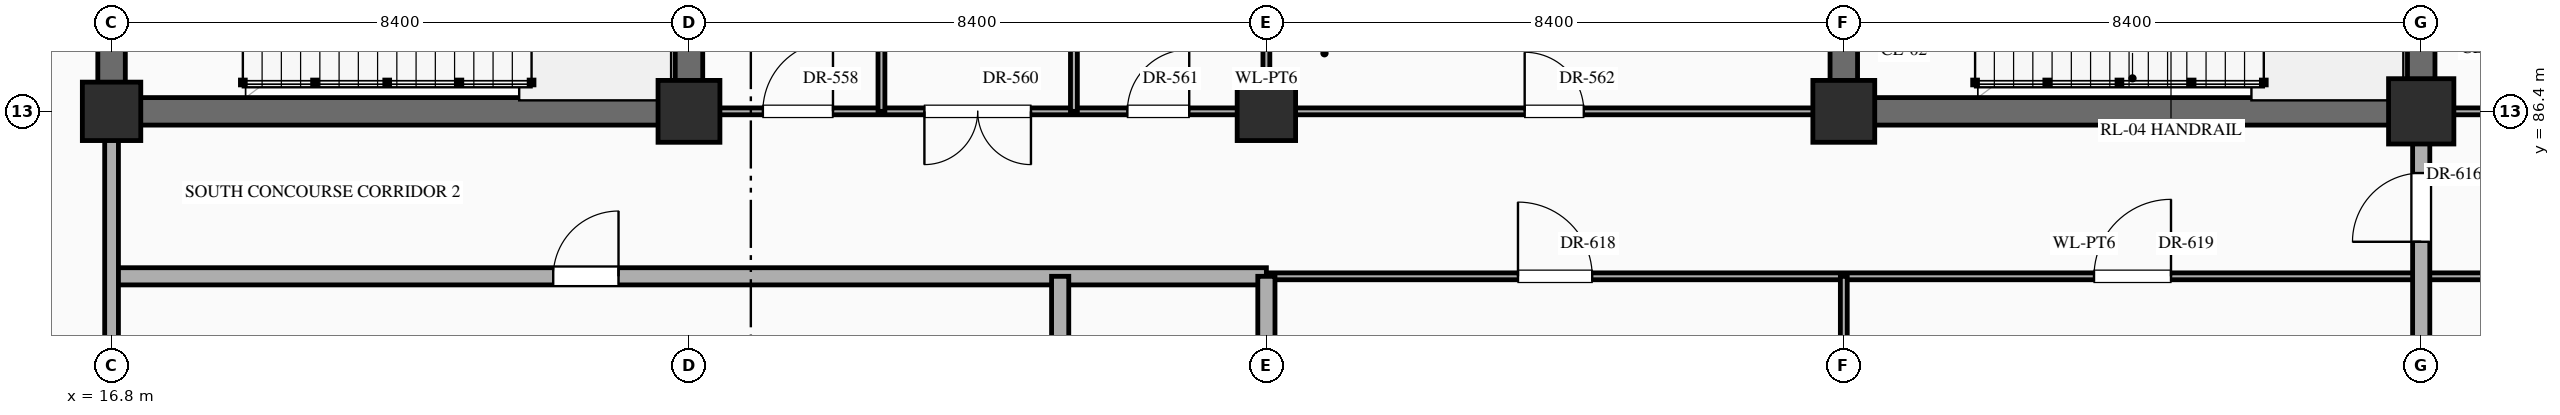
"""IFC4 building model, lengths in metres.
Left out: names, types, materials, properties, quantities, classifications, styles, units other than length and angle.
Written with IfcOpenShell. Run it as: python <this file> out.ifc"""

import sys

from ifc_helpers import new_model, si_unit, direction, frame, frame_2d, origin, origin_2d, place, context, subcontext, project, spatial, rectangle, extrude, element, fill, save


model = new_model("IFC4")
c1 = context("Model", 3, precision=1e-05, world=origin(), true_north=direction((0.0, 1.0)))
c2 = subcontext(c1, "Body", "Model", "MODEL_VIEW")
j1 = project(units=[si_unit("LENGTHUNIT", "METRE"), si_unit("PLANEANGLEUNIT", "RADIAN")], contexts=[c1])
p1 = place(None, origin())
s1 = spatial("IfcSite", under=j1, at=p1, CompositionType="ELEMENT")
p2 = place(p1, origin())
s2 = spatial("IfcBuilding", under=s1, at=p2, CompositionType="ELEMENT")
p3 = place(p2, frame((0.0, 0.0, -5.4)))
s3 = spatial("IfcBuildingStorey", under=s2, at=p3, CompositionType="ELEMENT", Elevation=-5.4)
p4 = place(p3, frame((16.8, 86.4, 0.0), z_axis=(0.0, 0.0, 1.0), x_axis=(1.0, 0.0, 0.0)))
e1 = element("IfcColumn", 1, at=p4, inside=s3, PredefinedType="COLUMN", context=c2, shape_type="SweptSolid", body=[
    extrude(rectangle(XDim=0.85, YDim=0.85, at=origin_2d()), origin(), (0.0, 0.0, 1.0), 5.4),
])
p5 = place(p3, frame((25.2, 86.4, 0.0), z_axis=(0.0, 0.0, 1.0), x_axis=(1.0, 0.0, 0.0)))
e2 = element("IfcColumn", 2, at=p5, inside=s3, PredefinedType="COLUMN", context=c2, shape_type="SweptSolid", body=[
    extrude(rectangle(XDim=0.9, YDim=0.9, at=origin_2d()), origin(), (0.0, 0.0, 1.0), 5.4),
])
p6 = place(p3, frame((33.6, 86.4, 0.0), z_axis=(0.0, 0.0, 1.0), x_axis=(1.0, 0.0, 0.0)))
e3 = element("IfcColumn", 3, at=p6, inside=s3, PredefinedType="COLUMN", context=c2, shape_type="SweptSolid", body=[
    extrude(rectangle(XDim=0.85, YDim=0.85, at=origin_2d()), origin(), (0.0, 0.0, 1.0), 5.4),
])
p7 = place(p3, frame((42.0, 86.4, 0.0), z_axis=(0.0, 0.0, 1.0), x_axis=(1.0, 0.0, 0.0)))
e4 = element("IfcColumn", 4, at=p7, inside=s3, PredefinedType="COLUMN", context=c2, shape_type="SweptSolid", body=[
    extrude(rectangle(XDim=0.9, YDim=0.9, at=origin_2d()), origin(), (0.0, 0.0, 1.0), 5.4),
])
p8 = place(p3, frame((50.4, 86.4, 0.0), z_axis=(0.0, 0.0, 1.0), x_axis=(1.0, 0.0, 0.0)))
e5 = element("IfcColumn", 5, at=p8, inside=s3, PredefinedType="COLUMN", context=c2, shape_type="SweptSolid", body=[
    extrude(rectangle(XDim=0.95, YDim=0.95, at=origin_2d()), origin(), (0.0, 0.0, 1.0), 5.4),
])
p9 = place(p3, frame((16.8, 84.0, 0.0), z_axis=(0.0, 0.0, 1.0), x_axis=(1.0, 0.0, 0.0)))
e6 = element("IfcWall", 6, at=p9, inside=s3, PredefinedType="STANDARD", context=c2, shape_type="SweptSolid", body=[
    extrude(rectangle(XDim=16.8, YDim=0.25, at=frame_2d((8.4, 0.0))), origin(), (0.0, 0.0, 1.0), 5.1),
])
p10 = place(p9, frame((6.425, 0.0, 0.0)))
e7 = element("IfcOpeningElement", 7, at=p10, cuts=e6, PredefinedType="OPENING", context=c2, shape_type="SweptSolid", body=[
    extrude(rectangle(XDim=0.95, YDim=2.15, at=frame_2d((0.475, 1.075))), frame((0.0, 0.137, 0.0), z_axis=(0.0, -1.0, 0.0), x_axis=(1.0, 0.0, 0.0)), (0.0, 0.0, 1.0), 0.274),
])
p11 = place(p3, frame((33.6, 84.0, 0.0), z_axis=(0.0, 0.0, 1.0), x_axis=(1.0, 0.0, 0.0)))
e8 = element("IfcWall", 8, at=p11, inside=s3, PredefinedType="STANDARD", context=c2, shape_type="SweptSolid", body=[
    extrude(rectangle(XDim=117.6, YDim=0.1, at=frame_2d((58.8, 0.0))), origin(), (0.0, 0.0, 1.0), 5.1),
])
p12 = place(p11, frame((3.66, 0.0, 0.0)))
e9 = element("IfcOpeningElement", 9, at=p12, cuts=e8, PredefinedType="OPENING", context=c2, shape_type="SweptSolid", body=[
    extrude(rectangle(XDim=1.08, YDim=2.25, at=frame_2d((0.54, 1.125))), frame((0.0, 0.062, 0.0), z_axis=(0.0, -1.0, 0.0), x_axis=(1.0, 0.0, 0.0)), (0.0, 0.0, 1.0), 0.124),
])
p13 = place(p11, frame((12.04, 0.0, 0.0)))
e10 = element("IfcOpeningElement", 10, at=p13, cuts=e8, PredefinedType="OPENING", context=c2, shape_type="SweptSolid", body=[
    extrude(rectangle(XDim=1.12, YDim=2.25, at=frame_2d((0.56, 1.125))), frame((0.0, 0.062, 0.0), z_axis=(0.0, -1.0, 0.0), x_axis=(1.0, 0.0, 0.0)), (0.0, 0.0, 1.0), 0.124),
])
p14 = place(p11, frame((20.4, 0.0, 0.0)))
e11 = element("IfcOpeningElement", 11, at=p14, cuts=e8, PredefinedType="OPENING", context=c2, shape_type="SweptSolid", body=[
    extrude(rectangle(XDim=1.2, YDim=2.35, at=frame_2d((0.6, 1.175))), frame((0.0, 0.062, 0.0), z_axis=(0.0, -1.0, 0.0), x_axis=(1.0, 0.0, 0.0)), (0.0, 0.0, 1.0), 0.124),
])
p15 = place(p11, frame((28.78, 0.0, 0.0)))
e12 = element("IfcOpeningElement", 12, at=p15, cuts=e8, PredefinedType="OPENING", context=c2, shape_type="SweptSolid", body=[
    extrude(rectangle(XDim=1.24, YDim=2.3, at=frame_2d((0.62, 1.15))), frame((0.0, 0.062, 0.0), z_axis=(0.0, -1.0, 0.0), x_axis=(1.0, 0.0, 0.0)), (0.0, 0.0, 1.0), 0.124),
])
p16 = place(p11, frame((37.16, 0.0, 0.0)))
e13 = element("IfcOpeningElement", 13, at=p16, cuts=e8, PredefinedType="OPENING", context=c2, shape_type="SweptSolid", body=[
    extrude(rectangle(XDim=1.28, YDim=2.35, at=frame_2d((0.64, 1.175))), frame((0.0, 0.062, 0.0), z_axis=(0.0, -1.0, 0.0), x_axis=(1.0, 0.0, 0.0)), (0.0, 0.0, 1.0), 0.124),
])
p17 = place(p11, frame((42.93, 0.0, 0.0)))
e14 = element("IfcOpeningElement", 14, at=p17, cuts=e8, PredefinedType="OPENING", context=c2, shape_type="SweptSolid", body=[
    extrude(rectangle(XDim=0.94, YDim=2.3, at=frame_2d((0.47, 1.15))), frame((0.0, 0.062, 0.0), z_axis=(0.0, -1.0, 0.0), x_axis=(1.0, 0.0, 0.0)), (0.0, 0.0, 1.0), 0.124),
])
p18 = place(p11, frame((45.71, 0.0, 0.0)))
e15 = element("IfcOpeningElement", 15, at=p18, cuts=e8, PredefinedType="OPENING", context=c2, shape_type="SweptSolid", body=[
    extrude(rectangle(XDim=0.98, YDim=2.35, at=frame_2d((0.49, 1.175))), frame((0.0, 0.062, 0.0), z_axis=(0.0, -1.0, 0.0), x_axis=(1.0, 0.0, 0.0)), (0.0, 0.0, 1.0), 0.124),
])
p19 = place(p11, frame((48.49, 0.0, 0.0)))
e16 = element("IfcOpeningElement", 16, at=p19, cuts=e8, PredefinedType="OPENING", context=c2, shape_type="SweptSolid", body=[
    extrude(rectangle(XDim=1.02, YDim=2.4, at=frame_2d((0.51, 1.2))), frame((0.0, 0.062, 0.0), z_axis=(0.0, -1.0, 0.0), x_axis=(1.0, 0.0, 0.0)), (0.0, 0.0, 1.0), 0.124),
])
p20 = place(p11, frame((54.03, 0.0, 0.0)))
e17 = element("IfcOpeningElement", 17, at=p20, cuts=e8, PredefinedType="OPENING", context=c2, shape_type="SweptSolid", body=[
    extrude(rectangle(XDim=1.14, YDim=2.4, at=frame_2d((0.57, 1.2))), frame((0.0, 0.062, 0.0), z_axis=(0.0, -1.0, 0.0), x_axis=(1.0, 0.0, 0.0)), (0.0, 0.0, 1.0), 0.124),
])
p21 = place(p11, frame((62.55, 0.0, 0.0)))
e18 = element("IfcOpeningElement", 18, at=p21, cuts=e8, PredefinedType="OPENING", context=c2, shape_type="SweptSolid", body=[
    extrude(rectangle(XDim=0.9, YDim=2.15, at=frame_2d((0.45, 1.075))), frame((0.0, 0.062, 0.0), z_axis=(0.0, -1.0, 0.0), x_axis=(1.0, 0.0, 0.0)), (0.0, 0.0, 1.0), 0.124),
])
p22 = place(p11, frame((70.97, 0.0, 0.0)))
e19 = element("IfcOpeningElement", 19, at=p22, cuts=e8, PredefinedType="OPENING", context=c2, shape_type="SweptSolid", body=[
    extrude(rectangle(XDim=0.86, YDim=2.1, at=frame_2d((0.43, 1.05))), frame((0.0, 0.062, 0.0), z_axis=(0.0, -1.0, 0.0), x_axis=(1.0, 0.0, 0.0)), (0.0, 0.0, 1.0), 0.124),
])
p23 = place(p11, frame((79.34, 0.0, 0.0)))
e20 = element("IfcOpeningElement", 20, at=p23, cuts=e8, PredefinedType="OPENING", context=c2, shape_type="SweptSolid", body=[
    extrude(rectangle(XDim=0.92, YDim=2.15, at=frame_2d((0.46, 1.075))), frame((0.0, 0.062, 0.0), z_axis=(0.0, -1.0, 0.0), x_axis=(1.0, 0.0, 0.0)), (0.0, 0.0, 1.0), 0.124),
])
p24 = place(p11, frame((87.72, 0.0, 0.0)))
e21 = element("IfcOpeningElement", 21, at=p24, cuts=e8, PredefinedType="OPENING", context=c2, shape_type="SweptSolid", body=[
    extrude(rectangle(XDim=0.96, YDim=2.2, at=frame_2d((0.48, 1.1))), frame((0.0, 0.062, 0.0), z_axis=(0.0, -1.0, 0.0), x_axis=(1.0, 0.0, 0.0)), (0.0, 0.0, 1.0), 0.124),
])
p25 = place(p11, frame((96.1, 0.0, 0.0)))
e22 = element("IfcOpeningElement", 22, at=p25, cuts=e8, PredefinedType="OPENING", context=c2, shape_type="SweptSolid", body=[
    extrude(rectangle(XDim=1.0, YDim=2.25, at=frame_2d((0.5, 1.125))), frame((0.0, 0.062, 0.0), z_axis=(0.0, -1.0, 0.0), x_axis=(1.0, 0.0, 0.0)), (0.0, 0.0, 1.0), 0.124),
])
p26 = place(p11, frame((104.48, 0.0, 0.0)))
e23 = element("IfcOpeningElement", 23, at=p26, cuts=e8, PredefinedType="OPENING", context=c2, shape_type="SweptSolid", body=[
    extrude(rectangle(XDim=1.04, YDim=2.2, at=frame_2d((0.52, 1.1))), frame((0.0, 0.062, 0.0), z_axis=(0.0, -1.0, 0.0), x_axis=(1.0, 0.0, 0.0)), (0.0, 0.0, 1.0), 0.124),
])
p27 = place(p11, frame((112.86, 0.0, 0.0)))
e24 = element("IfcOpeningElement", 24, at=p27, cuts=e8, PredefinedType="OPENING", context=c2, shape_type="SweptSolid", body=[
    extrude(rectangle(XDim=1.08, YDim=2.25, at=frame_2d((0.54, 1.125))), frame((0.0, 0.062, 0.0), z_axis=(0.0, -1.0, 0.0), x_axis=(1.0, 0.0, 0.0)), (0.0, 0.0, 1.0), 0.124),
])
p28 = place(p3, frame((16.8, 86.4, 0.0), z_axis=(0.0, 0.0, 1.0), x_axis=(1.0, 0.0, 0.0)))
e25 = element("IfcWall", 25, at=p28, inside=s3, PredefinedType="SHEAR", context=c2, shape_type="SweptSolid", body=[
    extrude(rectangle(XDim=8.4, YDim=0.4, at=frame_2d((4.2, 0.0))), origin(), (0.0, 0.0, 1.0), 5.1),
])
p29 = place(p3, frame((25.2, 86.4, 0.0), z_axis=(0.0, 0.0, 1.0), x_axis=(1.0, 0.0, 0.0)))
e26 = element("IfcWall", 26, at=p29, inside=s3, PredefinedType="STANDARD", context=c2, shape_type="SweptSolid", body=[
    extrude(rectangle(XDim=16.8, YDim=0.1, at=frame_2d((8.4, 0.0))), origin(), (0.0, 0.0, 1.0), 4.25),
])
p30 = place(p29, frame((1.075, 0.0, 0.0)))
e27 = element("IfcOpeningElement", 27, at=p30, cuts=e26, PredefinedType="OPENING", context=c2, shape_type="SweptSolid", body=[
    extrude(rectangle(XDim=1.02, YDim=2.4, at=frame_2d((0.51, 1.2))), frame((0.0, 0.062, 0.0), z_axis=(0.0, -1.0, 0.0), x_axis=(1.0, 0.0, 0.0)), (0.0, 0.0, 1.0), 0.124),
])
p31 = place(p29, frame((3.425, 0.0, 0.0)))
e28 = element("IfcOpeningElement", 28, at=p31, cuts=e26, PredefinedType="OPENING", context=c2, shape_type="SweptSolid", body=[
    extrude(rectangle(XDim=1.55, YDim=2.35, at=frame_2d((0.775, 1.175))), frame((0.0, 0.062, 0.0), z_axis=(0.0, -1.0, 0.0), x_axis=(1.0, 0.0, 0.0)), (0.0, 0.0, 1.0), 0.124),
])
p32 = place(p29, frame((6.377, 0.0, 0.0)))
e29 = element("IfcOpeningElement", 29, at=p32, cuts=e26, PredefinedType="OPENING", context=c2, shape_type="SweptSolid", body=[
    extrude(rectangle(XDim=0.9, YDim=2.15, at=frame_2d((0.45, 1.075))), frame((0.0, 0.062, 0.0), z_axis=(0.0, -1.0, 0.0), x_axis=(1.0, 0.0, 0.0)), (0.0, 0.0, 1.0), 0.124),
])
p33 = place(p29, frame((12.157, 0.0, 0.0)))
e30 = element("IfcOpeningElement", 30, at=p33, cuts=e26, PredefinedType="OPENING", context=c2, shape_type="SweptSolid", body=[
    extrude(rectangle(XDim=0.86, YDim=2.1, at=frame_2d((0.43, 1.05))), frame((0.0, 0.062, 0.0), z_axis=(0.0, -1.0, 0.0), x_axis=(1.0, 0.0, 0.0)), (0.0, 0.0, 1.0), 0.124),
])
p34 = place(p3, frame((42.0, 86.4, 0.0), z_axis=(0.0, 0.0, 1.0), x_axis=(1.0, 0.0, 0.0)))
e31 = element("IfcWall", 31, at=p34, inside=s3, PredefinedType="SHEAR", context=c2, shape_type="SweptSolid", body=[
    extrude(rectangle(XDim=8.4, YDim=0.4, at=frame_2d((4.2, 0.0))), origin(), (0.0, 0.0, 1.0), 5.1),
])
p35 = place(p3, frame((50.4, 86.4, 0.0), z_axis=(0.0, 0.0, 1.0), x_axis=(1.0, 0.0, 0.0)))
e32 = element("IfcWall", 32, at=p35, inside=s3, PredefinedType="STANDARD", context=c2, shape_type="SweptSolid", body=[
    extrude(rectangle(XDim=8.4, YDim=0.1, at=frame_2d((4.2, 0.0))), origin(), (0.0, 0.0, 1.0), 4.25),
])
p36 = place(p35, frame((1.117, 0.0, 0.0)))
e33 = element("IfcOpeningElement", 33, at=p36, cuts=e32, PredefinedType="OPENING", context=c2, shape_type="SweptSolid", body=[
    extrude(rectangle(XDim=0.96, YDim=2.2, at=frame_2d((0.48, 1.1))), frame((0.0, 0.062, 0.0), z_axis=(0.0, -1.0, 0.0), x_axis=(1.0, 0.0, 0.0)), (0.0, 0.0, 1.0), 0.124),
])
p37 = place(p35, frame((3.68, 0.0, 0.0)))
e34 = element("IfcOpeningElement", 34, at=p37, cuts=e32, PredefinedType="OPENING", context=c2, shape_type="SweptSolid", body=[
    extrude(rectangle(XDim=1.04, YDim=2.2, at=frame_2d((0.52, 1.1))), frame((0.0, 0.062, 0.0), z_axis=(0.0, -1.0, 0.0), x_axis=(1.0, 0.0, 0.0)), (0.0, 0.0, 1.0), 0.124),
])
p38 = place(p35, frame((6.262, 0.0, 0.0)))
e35 = element("IfcOpeningElement", 35, at=p38, cuts=e32, PredefinedType="OPENING", context=c2, shape_type="SweptSolid", body=[
    extrude(rectangle(XDim=1.08, YDim=2.25, at=frame_2d((0.54, 1.125))), frame((0.0, 0.062, 0.0), z_axis=(0.0, -1.0, 0.0), x_axis=(1.0, 0.0, 0.0)), (0.0, 0.0, 1.0), 0.124),
])
p39 = place(p3, frame((16.8, 60.0, 0.0), z_axis=(0.0, 0.0, 1.0), x_axis=(0.0, 1.0, 0.0)))
e36 = element("IfcWall", 36, at=p39, inside=s3, PredefinedType="STANDARD", context=c2, shape_type="SweptSolid", body=[
    extrude(rectangle(XDim=26.4, YDim=0.2, at=frame_2d((13.2, 0.0))), origin(), (0.0, 0.0, 1.0), 4.23),
])
for number, where, z_axis, x_axis in (
    (37, (16.8, 86.4, 0.0), (0.0, 0.0, 1.0), (0.0, 1.0, 0.0)),
    (38, (25.2, 86.4, 0.0), (0.0, 0.0, 1.0), (0.0, 1.0, 0.0)),
):
    element("IfcWall", number, at=place(p3, frame(where, z_axis=z_axis, x_axis=x_axis)), inside=s3, PredefinedType="SHEAR", context=c2, shape_type="SweptSolid", body=[
        extrude(rectangle(XDim=4.8, YDim=0.4, at=frame_2d((2.4, 0.0))), origin(), (0.0, 0.0, 1.0), 5.1),
    ])
p40 = place(p3, frame((28.0, 86.4, 0.0), z_axis=(0.0, 0.0, 1.0), x_axis=(0.0, 1.0, 0.0)))
e39 = element("IfcWall", 39, at=p40, inside=s3, PredefinedType="STANDARD", context=c2, shape_type="SweptSolid", body=[
    extrude(rectangle(XDim=7.2, YDim=0.1, at=frame_2d((3.6, 0.0))), origin(), (0.0, 0.0, 1.0), 5.1),
])
p41 = place(p40, frame((3.11, 0.0, 0.0)))
e40 = element("IfcOpeningElement", 40, at=p41, cuts=e39, PredefinedType="OPENING", context=c2, shape_type="SweptSolid", body=[
    extrude(rectangle(XDim=0.98, YDim=2.35, at=frame_2d((0.49, 1.175))), frame((0.0, 0.062, 0.0), z_axis=(0.0, -1.0, 0.0), x_axis=(1.0, 0.0, 0.0)), (0.0, 0.0, 1.0), 0.124),
])
p42 = place(p3, frame((30.6, 79.2, 0.0), z_axis=(0.0, 0.0, 1.0), x_axis=(0.0, 1.0, 0.0)))
e41 = element("IfcWall", 41, at=p42, inside=s3, PredefinedType="STANDARD", context=c2, shape_type="SweptSolid", body=[
    extrude(rectangle(XDim=4.8, YDim=0.25, at=frame_2d((2.4, 0.0))), origin(), (0.0, 0.0, 1.0), 5.1),
])
p43 = place(p42, frame((1.9, 0.0, 0.0)))
e42 = element("IfcOpeningElement", 42, at=p43, cuts=e41, PredefinedType="OPENING", context=c2, shape_type="SweptSolid", body=[
    extrude(rectangle(XDim=1.0, YDim=2.2, at=frame_2d((0.5, 1.1))), frame((0.0, 0.137, 0.0), z_axis=(0.0, -1.0, 0.0), x_axis=(1.0, 0.0, 0.0)), (0.0, 0.0, 1.0), 0.274),
])
p44 = place(p3, frame((30.8, 86.4, 0.0), z_axis=(0.0, 0.0, 1.0), x_axis=(0.0, 1.0, 0.0)))
e43 = element("IfcWall", 43, at=p44, inside=s3, PredefinedType="STANDARD", context=c2, shape_type="SweptSolid", body=[
    extrude(rectangle(XDim=7.2, YDim=0.1, at=frame_2d((3.6, 0.0))), origin(), (0.0, 0.0, 1.0), 5.1),
])
p45 = place(p44, frame((3.07, 0.0, 0.0)))
e44 = element("IfcOpeningElement", 44, at=p45, cuts=e43, PredefinedType="OPENING", context=c2, shape_type="SweptSolid", body=[
    extrude(rectangle(XDim=1.06, YDim=2.4, at=frame_2d((0.53, 1.2))), frame((0.0, 0.062, 0.0), z_axis=(0.0, -1.0, 0.0), x_axis=(1.0, 0.0, 0.0)), (0.0, 0.0, 1.0), 0.124),
])
p46 = place(p3, frame((33.6, 79.2, 0.0), z_axis=(0.0, 0.0, 1.0), x_axis=(0.0, 1.0, 0.0)))
e45 = element("IfcWall", 45, at=p46, inside=s3, PredefinedType="STANDARD", context=c2, shape_type="SweptSolid", body=[
    extrude(rectangle(XDim=4.8, YDim=0.25, at=frame_2d((2.4, 0.0))), origin(), (0.0, 0.0, 1.0), 4.35),
])
p47 = place(p3, frame((33.6, 86.4, 0.0), z_axis=(0.0, 0.0, 1.0), x_axis=(0.0, 1.0, 0.0)))
e46 = element("IfcWall", 46, at=p47, inside=s3, PredefinedType="STANDARD", context=c2, shape_type="SweptSolid", body=[
    extrude(rectangle(XDim=7.2, YDim=0.1, at=frame_2d((3.6, 0.0))), origin(), (0.0, 0.0, 1.0), 4.35),
])
p48 = place(p3, frame((42.0, 79.2, 0.0), z_axis=(0.0, 0.0, 1.0), x_axis=(0.0, 1.0, 0.0)))
e47 = element("IfcWall", 47, at=p48, inside=s3, PredefinedType="STANDARD", context=c2, shape_type="SweptSolid", body=[
    extrude(rectangle(XDim=4.8, YDim=0.1, at=frame_2d((2.4, 0.0))), origin(), (0.0, 0.0, 1.0), 4.35),
])
p49 = place(p3, frame((42.0, 86.4, 0.0), z_axis=(0.0, 0.0, 1.0), x_axis=(0.0, 1.0, 0.0)))
e48 = element("IfcWall", 48, at=p49, inside=s3, PredefinedType="SHEAR", context=c2, shape_type="SweptSolid", body=[
    extrude(rectangle(XDim=4.8, YDim=0.4, at=frame_2d((2.4, 0.0))), origin(), (0.0, 0.0, 1.0), 5.1),
])
p50 = place(p3, frame((50.4, 43.2, 0.0), z_axis=(0.0, 0.0, 1.0), x_axis=(0.0, 1.0, 0.0)))
e49 = element("IfcWall", 49, at=p50, inside=s3, PredefinedType="STANDARD", context=c2, shape_type="SweptSolid", body=[
    extrude(rectangle(XDim=43.2, YDim=0.25, at=frame_2d((21.6, 0.0))), origin(), (0.0, 0.0, 1.0), 4.23),
])
p51 = place(p50, frame((41.302, 0.0, 0.0)))
e50 = element("IfcOpeningElement", 50, at=p51, cuts=e49, PredefinedType="OPENING", context=c2, shape_type="SweptSolid", body=[
    extrude(rectangle(XDim=1.0, YDim=2.2, at=frame_2d((0.5, 1.1))), frame((0.0, 0.137, 0.0), z_axis=(0.0, -1.0, 0.0), x_axis=(1.0, 0.0, 0.0)), (0.0, 0.0, 1.0), 0.274),
])
p52 = place(p3, frame((50.4, 86.4, 0.0), z_axis=(0.0, 0.0, 1.0), x_axis=(0.0, 1.0, 0.0)))
e51 = element("IfcWall", 51, at=p52, inside=s3, PredefinedType="SHEAR", context=c2, shape_type="SweptSolid", body=[
    extrude(rectangle(XDim=4.8, YDim=0.4, at=frame_2d((2.4, 0.0))), origin(), (0.0, 0.0, 1.0), 5.1),
])
p53 = place(p30, origin())
e52 = element("IfcDoor", 52, at=p53, inside=s3, OperationType="SINGLE_SWING_RIGHT", PredefinedType="DOOR", context=c2, shape_type="SweptSolid", body=[
    extrude(rectangle(XDim=1.02, YDim=2.4, at=frame_2d((0.51, 1.2))), frame((0.0, 0.025, 0.0), z_axis=(0.0, -1.0, 0.0), x_axis=(1.0, 0.0, 0.0)), (0.0, 0.0, 1.0), 0.05),
])
fill(e27, e52)
p54 = place(p31, frame((1.55, 0.0, 0.0), z_axis=(0.0, 0.0, 1.0), x_axis=(-1.0, 0.0, 0.0)))
e53 = element("IfcDoor", 53, at=p54, inside=s3, OperationType="DOUBLE_DOOR_SINGLE_SWING", PredefinedType="DOOR", context=c2, shape_type="SweptSolid", body=[
    extrude(rectangle(XDim=1.55, YDim=2.35, at=frame_2d((0.775, 1.175))), frame((0.0, 0.025, 0.0), z_axis=(0.0, -1.0, 0.0), x_axis=(1.0, 0.0, 0.0)), (0.0, 0.0, 1.0), 0.05),
])
fill(e28, e53)
p55 = place(p32, origin())
e54 = element("IfcDoor", 54, at=p55, inside=s3, OperationType="SINGLE_SWING_RIGHT", PredefinedType="DOOR", context=c2, shape_type="SweptSolid", body=[
    extrude(rectangle(XDim=0.9, YDim=2.15, at=frame_2d((0.45, 1.075))), frame((0.0, 0.025, 0.0), z_axis=(0.0, -1.0, 0.0), x_axis=(1.0, 0.0, 0.0)), (0.0, 0.0, 1.0), 0.05),
])
fill(e29, e54)
p56 = place(p33, origin())
e55 = element("IfcDoor", 55, at=p56, inside=s3, OperationType="SINGLE_SWING_LEFT", PredefinedType="DOOR", context=c2, shape_type="SweptSolid", body=[
    extrude(rectangle(XDim=0.86, YDim=2.1, at=frame_2d((0.43, 1.05))), frame((0.0, 0.025, 0.0), z_axis=(0.0, -1.0, 0.0), x_axis=(1.0, 0.0, 0.0)), (0.0, 0.0, 1.0), 0.05),
])
fill(e30, e55)
p57 = place(p51, origin())
e56 = element("IfcDoor", 56, at=p57, inside=s3, OperationType="SINGLE_SWING_LEFT", PredefinedType="DOOR", context=c2, shape_type="SweptSolid", body=[
    extrude(rectangle(XDim=1.0, YDim=2.2, at=frame_2d((0.5, 1.1))), frame((0.0, 0.025, 0.0), z_axis=(0.0, -1.0, 0.0), x_axis=(1.0, 0.0, 0.0)), (0.0, 0.0, 1.0), 0.05),
])
fill(e50, e56)
p58 = place(p10, origin())
e57 = element("IfcDoor", 57, at=p58, inside=s3, OperationType="SINGLE_SWING_RIGHT", PredefinedType="DOOR", context=c2, shape_type="SweptSolid", body=[
    extrude(rectangle(XDim=0.95, YDim=2.15, at=frame_2d((0.475, 1.075))), frame((0.0, 0.025, 0.0), z_axis=(0.0, -1.0, 0.0), x_axis=(1.0, 0.0, 0.0)), (0.0, 0.0, 1.0), 0.05),
])
fill(e7, e57)
p59 = place(p12, origin())
e58 = element("IfcDoor", 58, at=p59, inside=s3, OperationType="SINGLE_SWING_LEFT", PredefinedType="DOOR", context=c2, shape_type="SweptSolid", body=[
    extrude(rectangle(XDim=1.08, YDim=2.25, at=frame_2d((0.54, 1.125))), frame((0.0, 0.025, 0.0), z_axis=(0.0, -1.0, 0.0), x_axis=(1.0, 0.0, 0.0)), (0.0, 0.0, 1.0), 0.05),
])
fill(e9, e58)
p60 = place(p13, origin())
e59 = element("IfcDoor", 59, at=p60, inside=s3, OperationType="SINGLE_SWING_RIGHT", PredefinedType="DOOR", context=c2, shape_type="SweptSolid", body=[
    extrude(rectangle(XDim=1.12, YDim=2.25, at=frame_2d((0.56, 1.125))), frame((0.0, 0.025, 0.0), z_axis=(0.0, -1.0, 0.0), x_axis=(1.0, 0.0, 0.0)), (0.0, 0.0, 1.0), 0.05),
])
fill(e10, e59)
save(model, sys.argv[1])
